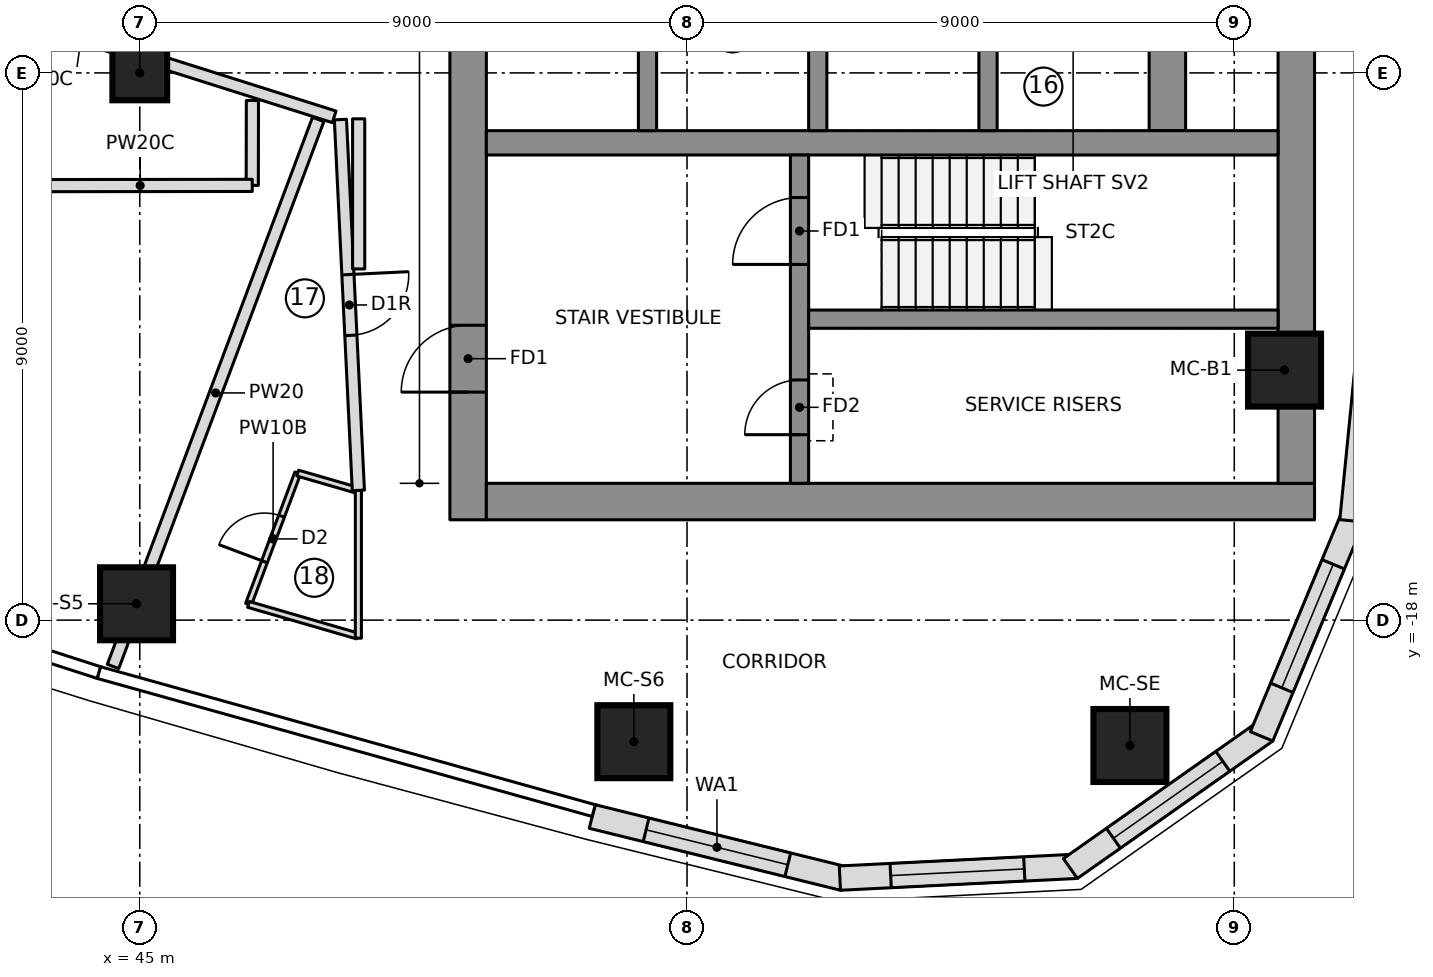
"""IFC4 building model, lengths in metres.
Left out: names, types, materials, properties, quantities, classifications, styles, units other than length and angle.
Written with IfcOpenShell. Run it as: python <this file> out.ifc"""

import sys

from ifc_helpers import new_model, si_unit, direction, frame, frame_2d, origin, origin_2d, place, context, subcontext, project, spatial, polyline, rectangle, outline, extrude, element, fill, save


model = new_model("IFC4")
c1 = context("Model", 3, precision=1e-05, world=origin(), true_north=direction((0.0, 1.0)))
c2 = subcontext(c1, "Body", "Model", "MODEL_VIEW")
j1 = project(units=[si_unit("LENGTHUNIT", "METRE"), si_unit("PLANEANGLEUNIT", "RADIAN")], contexts=[c1])
p1 = place(None, origin())
s1 = spatial("IfcSite", under=j1, at=p1, CompositionType="ELEMENT")
p2 = place(p1, origin())
s2 = spatial("IfcBuilding", under=s1, at=p2, CompositionType="ELEMENT")
p3 = place(p2, frame((0.0, 0.0, 245.65)))
s3 = spatial("IfcBuildingStorey", under=s2, at=p3, CompositionType="ELEMENT", Elevation=245.65)
p4 = place(p3, frame((50.4, -16.35, 0.0), z_axis=(0.0, 0.0, 1.0), x_axis=(0.0, 1.0, 0.0)))
e1 = element("IfcWall", 1, at=p4, inside=s3, PredefinedType="SHEAR", context=c2, shape_type="SweptSolid", body=[
    extrude(rectangle(XDim=9.7, YDim=0.6, at=frame_2d((4.85, 0.0))), origin(), (0.0, 0.0, 1.0), 3.55),
])
p5 = place(p4, frame((2.1, 0.0, 0.0)))
e2 = element("IfcOpeningElement", 2, at=p5, cuts=e1, PredefinedType="OPENING", context=c2, shape_type="SweptSolid", body=[
    extrude(rectangle(XDim=1.1, YDim=2.1, at=frame_2d((0.55, 1.05))), frame((0.0, 0.31, 0.0), z_axis=(0.0, -1.0, 0.0), x_axis=(1.0, 0.0, 0.0)), (0.0, 0.0, 1.0), 0.62),
])
p6 = place(p3, frame((50.7, -16.05, 0.0), z_axis=(0.0, 0.0, 1.0), x_axis=(1.0, 0.0, 0.0)))
e3 = element("IfcWall", 3, at=p6, inside=s3, PredefinedType="SHEAR", context=c2, shape_type="SweptSolid", body=[
    extrude(rectangle(XDim=13.62, YDim=0.6, at=frame_2d((6.81, 0.0))), origin(), (0.0, 0.0, 1.0), 3.55),
])
p7 = place(p3, frame((64.02, -15.75, 0.0), z_axis=(0.0, 0.0, 1.0), x_axis=(0.0, 1.0, 0.0)))
e4 = element("IfcWall", 4, at=p7, inside=s3, PredefinedType="SHEAR", context=c2, shape_type="SweptSolid", body=[
    extrude(rectangle(XDim=8.248, YDim=0.6, at=frame_2d((4.124, 0.0))), origin(), (0.0, 0.0, 1.0), 3.55),
])
p8 = place(p3, frame((61.9, -9.95, 0.0), z_axis=(0.0, 0.0, 1.0), x_axis=(0.0, 1.0, 0.0)))
e5 = element("IfcWall", 5, at=p8, inside=s3, PredefinedType="SHEAR", context=c2, shape_type="SweptSolid", body=[
    extrude(rectangle(XDim=19.9, YDim=0.6, at=frame_2d((9.95, 0.0))), origin(), (0.0, 0.0, 1.0), 3.55),
])
p9 = place(p3, frame((50.7, -10.15, 0.0), z_axis=(0.0, 0.0, 1.0), x_axis=(1.0, 0.0, 0.0)))
e6 = element("IfcWall", 6, at=p9, inside=s3, PredefinedType="SHEAR", context=c2, shape_type="SweptSolid", body=[
    extrude(rectangle(XDim=13.02, YDim=0.4, at=frame_2d((6.51, 0.0))), origin(), (0.0, 0.0, 1.0), 3.55),
])
for number, where, z_axis, x_axis in (
    (7, (53.35, -9.95, 0.0), (0.0, 0.0, 1.0), (0.0, 1.0, 0.0)),
    (8, (56.15, -9.95, 0.0), (0.0, 0.0, 1.0), (0.0, 1.0, 0.0)),
    (9, (58.95, -9.95, 0.0), (0.0, 0.0, 1.0), (0.0, 1.0, 0.0)),
):
    element("IfcWall", number, at=place(p3, frame(where, z_axis=z_axis, x_axis=x_axis)), inside=s3, PredefinedType="SHEAR", context=c2, shape_type="SweptSolid", body=[
        extrude(rectangle(XDim=3.0, YDim=0.3, at=frame_2d((1.5, 0.0))), origin(), (0.0, 0.0, 1.0), 3.55),
    ])
p10 = place(p3, frame((55.85, -15.75, 0.0), z_axis=(0.0, 0.0, 1.0), x_axis=(0.0, 1.0, 0.0)))
e10 = element("IfcWall", 10, at=p10, inside=s3, PredefinedType="SHEAR", context=c2, shape_type="SweptSolid", body=[
    extrude(rectangle(XDim=5.4, YDim=0.3, at=frame_2d((2.7, 0.0))), origin(), (0.0, 0.0, 1.0), 3.55),
])
p11 = place(p10, frame((3.6, 0.0, 0.0)))
e11 = element("IfcOpeningElement", 11, at=p11, cuts=e10, PredefinedType="OPENING", context=c2, shape_type="SweptSolid", body=[
    extrude(rectangle(XDim=1.1, YDim=2.1, at=frame_2d((0.55, 1.05))), frame((0.0, 0.16, 0.0), z_axis=(0.0, -1.0, 0.0), x_axis=(1.0, 0.0, 0.0)), (0.0, 0.0, 1.0), 0.32),
])
p12 = place(p10, frame((0.8, 0.0, 0.0)))
e12 = element("IfcOpeningElement", 12, at=p12, cuts=e10, PredefinedType="OPENING", context=c2, shape_type="SweptSolid", body=[
    extrude(rectangle(XDim=0.9, YDim=2.1, at=frame_2d((0.45, 1.05))), frame((0.0, 0.16, 0.0), z_axis=(0.0, -1.0, 0.0), x_axis=(1.0, 0.0, 0.0)), (0.0, 0.0, 1.0), 0.32),
])
p13 = place(p3, frame((56.0, -13.05, 0.0), z_axis=(0.0, 0.0, 1.0), x_axis=(1.0, 0.0, 0.0)))
e13 = element("IfcWall", 13, at=p13, inside=s3, PredefinedType="SHEAR", context=c2, shape_type="SweptSolid", body=[
    extrude(rectangle(XDim=7.72, YDim=0.3, at=frame_2d((3.86, 0.0))), origin(), (0.0, 0.0, 1.0), 3.55),
])
for number, where, z_axis, x_axis in (
    (14, (44.947, -17.731, 0.0), (0.0, 0.0, 1.0), (1.0, 0.0, 0.0)),
    (15, (53.125, -20.0, 0.0), (0.0, 0.0, 1.0), (1.0, 0.0, 0.0)),
    (16, (61.284, -20.062, 0.0), (0.0, 0.0, 1.0), (1.0, 0.0, 0.0)),
    (17, (63.826, -13.888, 0.0), (0.0, 0.0, 1.0), (1.0, 0.0, 0.0)),
):
    element("IfcColumn", number, at=place(p3, frame(where, z_axis=z_axis, x_axis=x_axis)), inside=s3, PredefinedType="COLUMN", context=c2, shape_type="SweptSolid", body=[
        extrude(rectangle(XDim=1.2, YDim=1.2, at=origin_2d()), origin(), (0.0, 0.0, 1.0), 3.55),
    ])
p14 = place(p3, frame((45.0, -9.0, 0.0), z_axis=(0.0, 0.0, 1.0), x_axis=(1.0, 0.0, 0.0)))
e18 = element("IfcColumn", 18, at=p14, inside=s3, PredefinedType="COLUMN", context=c2, shape_type="SweptSolid", body=[
    extrude(rectangle(XDim=0.9, YDim=0.9, at=origin_2d()), origin(), (0.0, 0.0, 1.0), 3.55),
])
p15 = place(p3, frame((52.441, -21.23, 0.0), z_axis=(0.0, 0.0, 1.0), x_axis=(0.970902342456, -0.23947576373, 0.0)))
e19 = element("IfcWall", 19, at=p15, inside=s3, PredefinedType="NOTDEFINED", context=c2, shape_type="SweptSolid", body=[
    extrude(outline(polyline([(0.0, -0.2), (4.255, -0.2), (4.197, 0.2), (0.0, 0.2), (0.0, -0.2)])), origin(), (0.0, 0.0, 1.0), 3.25),
])
p16 = place(p15, frame((0.913, 0.0, 0.5)))
e20 = element("IfcOpeningElement", 20, at=p16, cuts=e19, PredefinedType="OPENING", context=c2, shape_type="SweptSolid", body=[
    extrude(rectangle(XDim=2.4, YDim=2.0, at=frame_2d((1.2, 1.0))), frame((0.0, 0.21, 0.0), z_axis=(0.0, -1.0, 0.0), x_axis=(1.0, 0.0, 0.0)), (0.0, 0.0, 1.0), 0.42),
])
p17 = place(p3, frame((56.543, -22.242, 0.0), z_axis=(0.0, 0.0, 1.0), x_axis=(0.998758875872, 0.049806705046, 0.0)))
e21 = element("IfcWall", 21, at=p17, inside=s3, PredefinedType="NOTDEFINED", context=c2, shape_type="SweptSolid", body=[
    extrude(outline(polyline([(-0.029, -0.2), (3.871, -0.2), (3.756, 0.2), (0.029, 0.2), (-0.029, -0.2)])), origin(), (0.0, 0.0, 1.0), 3.25),
])
p18 = place(p17, frame((0.807, 0.0, 0.6)))
e22 = element("IfcOpeningElement", 22, at=p18, cuts=e21, PredefinedType="OPENING", context=c2, shape_type="SweptSolid", body=[
    extrude(outline(polyline([(0.0, 1.35), (0.084, 1.771), (0.322, 2.128), (0.679, 2.366), (1.1, 2.45), (1.521, 2.366), (1.878, 2.128), (2.116, 1.771), (2.2, 1.35), (2.2, 1.1), (2.116, 0.679), (1.878, 0.322), (1.521, 0.084), (1.1, 0.0), (0.679, 0.084), (0.322, 0.322), (0.084, 0.679), (0.0, 1.1), (0.0, 1.35)])), frame((0.0, 0.21, 0.0), z_axis=(0.0, -1.0, 0.0), x_axis=(1.0, 0.0, 0.0)), (0.0, 0.0, 1.0), 0.42),
])
p19 = place(p3, frame((60.352, -22.052, 0.0), z_axis=(0.0, 0.0, 1.0), x_axis=(0.817942545532, 0.575299915009, 0.0)))
e23 = element("IfcWall", 23, at=p19, inside=s3, PredefinedType="NOTDEFINED", context=c2, shape_type="SweptSolid", body=[
    extrude(outline(polyline([(-0.058, -0.2), (3.871, -0.2), (3.756, 0.2), (0.058, 0.2), (-0.058, -0.2)])), origin(), (0.0, 0.0, 1.0), 3.25),
])
p20 = place(p19, frame((0.807, 0.0, 0.6)))
e24 = element("IfcOpeningElement", 24, at=p20, cuts=e23, PredefinedType="OPENING", context=c2, shape_type="SweptSolid", body=[
    extrude(outline(polyline([(0.0, 1.35), (0.084, 1.771), (0.322, 2.128), (0.679, 2.366), (1.1, 2.45), (1.521, 2.366), (1.878, 2.128), (2.116, 1.771), (2.2, 1.35), (2.2, 1.1), (2.116, 0.679), (1.878, 0.322), (1.521, 0.084), (1.1, 0.0), (0.679, 0.084), (0.322, 0.322), (0.084, 0.679), (0.0, 1.1), (0.0, 1.35)])), frame((0.0, 0.21, 0.0), z_axis=(0.0, -1.0, 0.0), x_axis=(1.0, 0.0, 0.0)), (0.0, 0.0, 1.0), 0.42),
])
p21 = place(p3, frame((63.471, -19.858, 0.0), z_axis=(0.0, 0.0, 1.0), x_axis=(0.3844335483, 0.923152667191, 0.0)))
e25 = element("IfcWall", 25, at=p21, inside=s3, PredefinedType="NOTDEFINED", context=c2, shape_type="SweptSolid", body=[
    extrude(outline(polyline([(-0.058, -0.2), (3.843, -0.2), (3.784, 0.2), (0.058, 0.2), (-0.058, -0.2)])), origin(), (0.0, 0.0, 1.0), 3.25),
])
p22 = place(p21, frame((0.807, 0.0, 0.6)))
e26 = element("IfcOpeningElement", 26, at=p22, cuts=e25, PredefinedType="OPENING", context=c2, shape_type="SweptSolid", body=[
    extrude(outline(polyline([(0.0, 1.35), (0.084, 1.771), (0.322, 2.128), (0.679, 2.366), (1.1, 2.45), (1.521, 2.366), (1.878, 2.128), (2.116, 1.771), (2.2, 1.35), (2.2, 1.1), (2.116, 0.679), (1.878, 0.322), (1.521, 0.084), (1.1, 0.0), (0.679, 0.084), (0.322, 0.322), (0.084, 0.679), (0.0, 1.1), (0.0, 1.35)])), frame((0.0, 0.21, 0.0), z_axis=(0.0, -1.0, 0.0), x_axis=(1.0, 0.0, 0.0)), (0.0, 0.0, 1.0), 0.42),
])
p23 = place(p3, frame((64.938, -16.337, 0.0), z_axis=(0.0, 0.0, 1.0), x_axis=(0.098718218066, 0.995115427185, 0.0)))
e27 = element("IfcWall", 27, at=p23, inside=s3, PredefinedType="NOTDEFINED", context=c2, shape_type="SweptSolid", body=[
    extrude(outline(polyline([(-0.03, -0.2), (4.096, -0.2), (4.09, 0.2), (0.03, 0.2), (-0.03, -0.2)])), origin(), (0.0, 0.0, 1.0), 3.25),
])
p24 = place(p23, frame((1.926, 0.0, 0.5)))
e28 = element("IfcOpeningElement", 28, at=p24, cuts=e27, PredefinedType="OPENING", context=c2, shape_type="SweptSolid", body=[
    extrude(rectangle(XDim=1.9, YDim=2.0, at=frame_2d((0.95, 1.0))), frame((0.0, 0.21, 0.0), z_axis=(0.0, -1.0, 0.0), x_axis=(1.0, 0.0, 0.0)), (0.0, 0.0, 1.0), 0.42),
])
p25 = place(p3, frame((39.882, -7.091, 0.0), z_axis=(0.0, 0.0, 1.0), x_axis=(0.953395918068, -0.301722096326, 0.0)))
e29 = element("IfcWall", 29, at=p25, inside=s3, PredefinedType="PARTITIONING", context=c2, shape_type="SweptSolid", body=[
    extrude(rectangle(XDim=8.722, YDim=0.2, at=frame_2d((4.361, 0.0))), origin(), (0.0, 0.0, 1.0), 3.25),
])
p26 = place(p25, frame((3.05, 0.0, 0.0)))
e30 = element("IfcOpeningElement", 30, at=p26, cuts=e29, PredefinedType="OPENING", context=c2, shape_type="SweptSolid", body=[
    extrude(rectangle(XDim=1.0, YDim=2.1, at=frame_2d((0.5, 1.05))), frame((0.0, 0.11, 0.0), z_axis=(0.0, -1.0, 0.0), x_axis=(1.0, 0.0, 0.0)), (0.0, 0.0, 1.0), 0.22),
])
p27 = place(p3, frame((44.56, -18.762, 0.0), z_axis=(0.0, 0.0, 1.0), x_axis=(0.35112901071, 0.936327089129, 0.0)))
e31 = element("IfcWall", 31, at=p27, inside=s3, PredefinedType="PARTITIONING", context=c2, shape_type="SweptSolid", body=[
    extrude(rectangle(XDim=9.608, YDim=0.2, at=frame_2d((4.804, 0.0))), origin(), (0.0, 0.0, 1.0), 3.25),
])
p28 = place(p3, frame((46.788, -17.741, 0.0), z_axis=(0.0, 0.0, 1.0), x_axis=(0.351158236187, 0.936316128857, 0.0)))
e32 = element("IfcWall", 32, at=p28, inside=s3, PredefinedType="PARTITIONING", context=c2, shape_type="SweptSolid", body=[
    extrude(rectangle(XDim=2.307, YDim=0.1, at=frame_2d((1.153, 0.0))), origin(), (0.0, 0.0, 1.0), 3.25),
])
p29 = place(p28, frame((0.75, 0.0, 0.0)))
e33 = element("IfcOpeningElement", 33, at=p29, cuts=e32, PredefinedType="OPENING", context=c2, shape_type="SweptSolid", body=[
    extrude(rectangle(XDim=0.8, YDim=2.1, at=frame_2d((0.4, 1.05))), frame((0.0, 0.06, 0.0), z_axis=(0.0, -1.0, 0.0), x_axis=(1.0, 0.0, 0.0)), (0.0, 0.0, 1.0), 0.12),
])
p30 = place(p3, frame((47.598, -15.582, 0.0), z_axis=(0.0, 0.0, 1.0), x_axis=(0.960468222897, -0.278389642057, 0.0)))
e34 = element("IfcWall", 34, at=p30, inside=s3, PredefinedType="PARTITIONING", context=c2, shape_type="SweptSolid", body=[
    extrude(rectangle(XDim=1.019, YDim=0.1, at=frame_2d((0.51, 0.0))), origin(), (0.0, 0.0, 1.0), 3.25),
])
p31 = place(p3, frame((48.578, -18.26, 0.0), z_axis=(0.0, 0.0, 1.0), x_axis=(-0.960473980386, 0.278369777458, 0.0)))
e35 = element("IfcWall", 35, at=p31, inside=s3, PredefinedType="PARTITIONING", context=c2, shape_type="SweptSolid", body=[
    extrude(rectangle(XDim=1.864, YDim=0.1, at=frame_2d((0.932, 0.0))), origin(), (0.0, 0.0, 1.0), 3.25),
])
p32 = place(p3, frame((48.595, -15.866, 0.0), z_axis=(0.0, 0.0, 1.0), x_axis=(0.0, -1.0, 0.0)))
e36 = element("IfcWall", 36, at=p32, inside=s3, PredefinedType="PARTITIONING", context=c2, shape_type="SweptSolid", body=[
    extrude(rectangle(XDim=2.431, YDim=0.1, at=frame_2d((1.215, 0.0))), origin(), (0.0, 0.0, 1.0), 3.25),
])
p33 = place(p3, frame((48.3, -9.767, 0.0), z_axis=(0.0, 0.0, 1.0), x_axis=(0.048302241024, -0.998832765538, 0.0)))
e37 = element("IfcWall", 37, at=p33, inside=s3, PredefinedType="PARTITIONING", context=c2, shape_type="SweptSolid", body=[
    extrude(rectangle(XDim=6.106, YDim=0.2, at=frame_2d((3.053, 0.0))), origin(), (0.0, 0.0, 1.0), 3.25),
])
p34 = place(p33, frame((2.553, 0.0, 0.0)))
e38 = element("IfcOpeningElement", 38, at=p34, cuts=e37, PredefinedType="OPENING", context=c2, shape_type="SweptSolid", body=[
    extrude(rectangle(XDim=1.0, YDim=2.1, at=frame_2d((0.5, 1.05))), frame((0.0, 0.11, 0.0), z_axis=(0.0, -1.0, 0.0), x_axis=(1.0, 0.0, 0.0)), (0.0, 0.0, 1.0), 0.22),
])
p35 = place(p3, frame((46.853, -9.454, 0.0), z_axis=(0.0, 0.0, 1.0), x_axis=(-0.001748860564, -0.999998470742, 0.0)))
e39 = element("IfcWall", 39, at=p35, inside=s3, PredefinedType="PARTITIONING", context=c2, shape_type="SweptSolid", body=[
    extrude(rectangle(XDim=1.396, YDim=0.2, at=frame_2d((0.698, 0.0))), origin(), (0.0, 0.0, 1.0), 3.25),
])
p36 = place(p3, frame((46.85, -10.85, 0.0), z_axis=(0.0, 0.0, 1.0), x_axis=(-0.999999438919, -0.00105932144, 0.0)))
e40 = element("IfcWall", 40, at=p36, inside=s3, PredefinedType="PARTITIONING", context=c2, shape_type="SweptSolid", body=[
    extrude(rectangle(XDim=3.688, YDim=0.2, at=frame_2d((1.844, 0.0))), origin(), (0.0, 0.0, 1.0), 3.25),
])
p37 = place(p3, frame((48.6, -12.224, 0.0), z_axis=(0.0, 0.0, 1.0), x_axis=(0.0, 1.0, 0.0)))
e41 = element("IfcWall", 41, at=p37, inside=s3, PredefinedType="PARTITIONING", context=c2, shape_type="SweptSolid", body=[
    extrude(rectangle(XDim=2.469, YDim=0.2, at=frame_2d((1.234, 0.0))), origin(), (0.0, 0.0, 1.0), 3.25),
])
p38 = place(p16, origin())
e42 = element("IfcWindow", 42, at=p38, inside=s3, PartitioningType="SINGLE_PANEL", PredefinedType="WINDOW", context=c2, shape_type="SweptSolid", body=[
    extrude(rectangle(XDim=2.4, YDim=2.0, at=frame_2d((1.2, 1.0))), frame((0.0, 0.17, 0.0), z_axis=(0.0, -1.0, 0.0), x_axis=(1.0, 0.0, 0.0)), (0.0, 0.0, 1.0), 0.06),
])
fill(e20, e42)
p39 = place(p18, origin())
e43 = element("IfcWindow", 43, at=p39, inside=s3, PartitioningType="SINGLE_PANEL", PredefinedType="WINDOW", context=c2, shape_type="SweptSolid", body=[
    extrude(outline(polyline([(0.0, 1.35), (0.084, 1.771), (0.322, 2.128), (0.679, 2.366), (1.1, 2.45), (1.521, 2.366), (1.878, 2.128), (2.116, 1.771), (2.2, 1.35), (2.2, 1.1), (2.116, 0.679), (1.878, 0.322), (1.521, 0.084), (1.1, 0.0), (0.679, 0.084), (0.322, 0.322), (0.084, 0.679), (0.0, 1.1), (0.0, 1.35)])), frame((0.0, 0.17, 0.0), z_axis=(0.0, -1.0, 0.0), x_axis=(1.0, 0.0, 0.0)), (0.0, 0.0, 1.0), 0.06),
])
fill(e22, e43)
p40 = place(p20, origin())
e44 = element("IfcWindow", 44, at=p40, inside=s3, PartitioningType="SINGLE_PANEL", PredefinedType="WINDOW", context=c2, shape_type="SweptSolid", body=[
    extrude(outline(polyline([(0.0, 1.35), (0.084, 1.771), (0.322, 2.128), (0.679, 2.366), (1.1, 2.45), (1.521, 2.366), (1.878, 2.128), (2.116, 1.771), (2.2, 1.35), (2.2, 1.1), (2.116, 0.679), (1.878, 0.322), (1.521, 0.084), (1.1, 0.0), (0.679, 0.084), (0.322, 0.322), (0.084, 0.679), (0.0, 1.1), (0.0, 1.35)])), frame((0.0, 0.17, 0.0), z_axis=(0.0, -1.0, 0.0), x_axis=(1.0, 0.0, 0.0)), (0.0, 0.0, 1.0), 0.06),
])
fill(e24, e44)
p41 = place(p22, origin())
e45 = element("IfcWindow", 45, at=p41, inside=s3, PartitioningType="SINGLE_PANEL", PredefinedType="WINDOW", context=c2, shape_type="SweptSolid", body=[
    extrude(outline(polyline([(0.0, 1.35), (0.084, 1.771), (0.322, 2.128), (0.679, 2.366), (1.1, 2.45), (1.521, 2.366), (1.878, 2.128), (2.116, 1.771), (2.2, 1.35), (2.2, 1.1), (2.116, 0.679), (1.878, 0.322), (1.521, 0.084), (1.1, 0.0), (0.679, 0.084), (0.322, 0.322), (0.084, 0.679), (0.0, 1.1), (0.0, 1.35)])), frame((0.0, 0.17, 0.0), z_axis=(0.0, -1.0, 0.0), x_axis=(1.0, 0.0, 0.0)), (0.0, 0.0, 1.0), 0.06),
])
fill(e26, e45)
p42 = place(p29, origin())
e46 = element("IfcDoor", 46, at=p42, inside=s3, OperationType="SINGLE_SWING_LEFT", PredefinedType="DOOR", context=c2, shape_type="SweptSolid", body=[
    extrude(rectangle(XDim=0.8, YDim=2.1, at=frame_2d((0.4, 1.05))), frame((0.0, 0.025, 0.0), z_axis=(0.0, -1.0, 0.0), x_axis=(1.0, 0.0, 0.0)), (0.0, 0.0, 1.0), 0.05),
])
fill(e33, e46)
p43 = place(p34, origin())
e47 = element("IfcDoor", 47, at=p43, inside=s3, OperationType="SINGLE_SWING_RIGHT", PredefinedType="DOOR", context=c2, shape_type="SweptSolid", body=[
    extrude(rectangle(XDim=1.0, YDim=2.1, at=frame_2d((0.5, 1.05))), frame((0.0, 0.025, 0.0), z_axis=(0.0, -1.0, 0.0), x_axis=(1.0, 0.0, 0.0)), (0.0, 0.0, 1.0), 0.05),
])
fill(e38, e47)
p44 = place(p11, origin())
e48 = element("IfcDoor", 48, at=p44, inside=s3, OperationType="SINGLE_SWING_RIGHT", PredefinedType="DOOR", context=c2, shape_type="SweptSolid", body=[
    extrude(rectangle(XDim=1.1, YDim=2.1, at=frame_2d((0.55, 1.05))), frame((0.0, 0.025, 0.0), z_axis=(0.0, -1.0, 0.0), x_axis=(1.0, 0.0, 0.0)), (0.0, 0.0, 1.0), 0.05),
])
fill(e11, e48)
p45 = place(p5, origin())
e49 = element("IfcDoor", 49, at=p45, inside=s3, OperationType="SINGLE_SWING_RIGHT", PredefinedType="DOOR", context=c2, shape_type="SweptSolid", body=[
    extrude(rectangle(XDim=1.1, YDim=2.1, at=frame_2d((0.55, 1.05))), frame((0.0, 0.025, 0.0), z_axis=(0.0, -1.0, 0.0), x_axis=(1.0, 0.0, 0.0)), (0.0, 0.0, 1.0), 0.05),
])
fill(e2, e49)
p46 = place(p12, origin())
e50 = element("IfcDoor", 50, at=p46, inside=s3, OperationType="SINGLE_SWING_LEFT", PredefinedType="DOOR", context=c2, shape_type="SweptSolid", body=[
    extrude(rectangle(XDim=0.9, YDim=2.1, at=frame_2d((0.45, 1.05))), frame((0.0, 0.025, 0.0), z_axis=(0.0, -1.0, 0.0), x_axis=(1.0, 0.0, 0.0)), (0.0, 0.0, 1.0), 0.05),
])
fill(e12, e50)
save(model, sys.argv[1])
